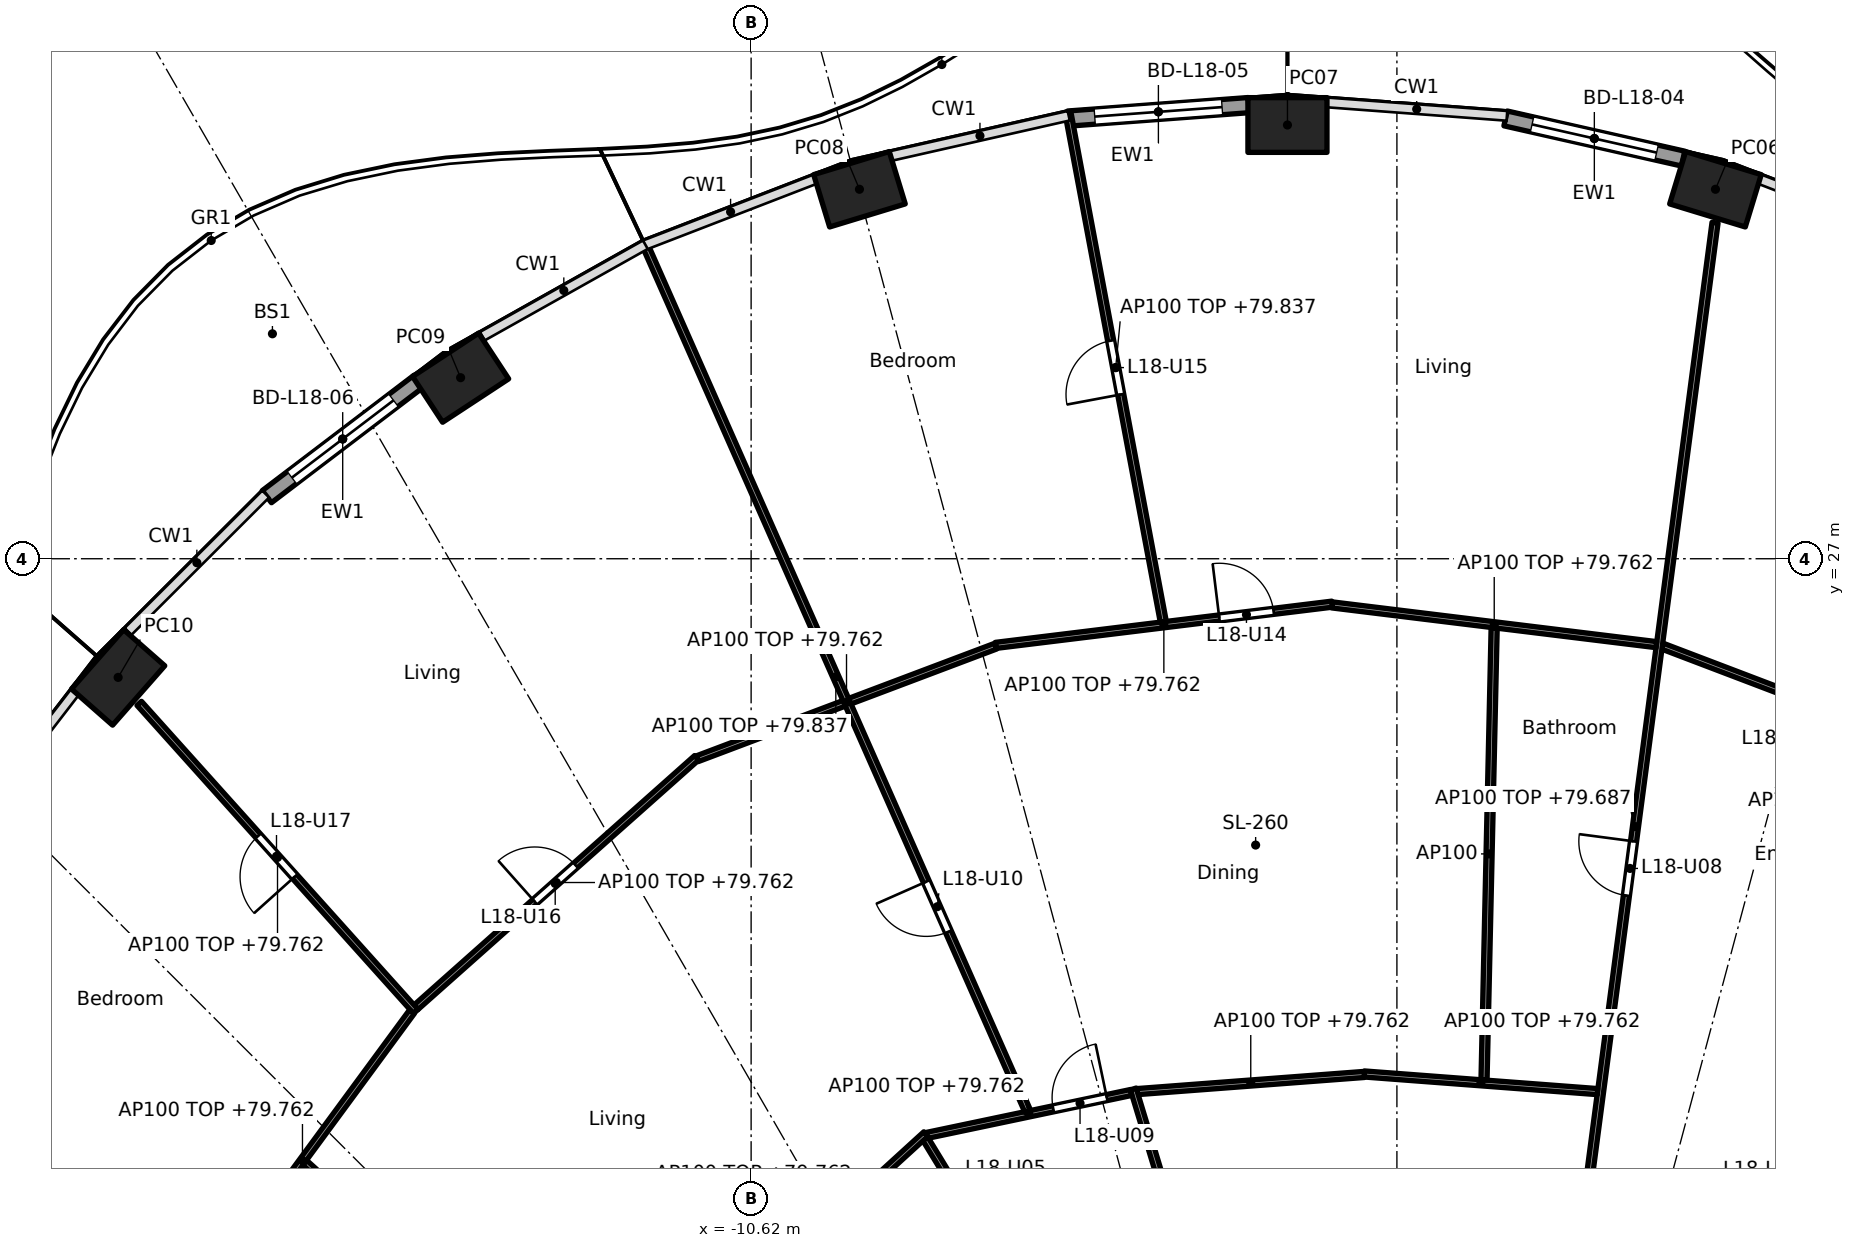
"""IFC4 building model, lengths in metres.
Left out: names, types, materials, properties, quantities, classifications, styles, units other than length and angle.
Written with IfcOpenShell. Run it as: python <this file> out.ifc"""

import sys

from ifc_helpers import new_model, si_unit, direction, frame, frame_2d, origin, origin_2d, place, context, subcontext, project, spatial, rectangle, hollow_rectangle, extrude, element, fill, save


model = new_model("IFC4")
c1 = context("Model", 3, precision=1e-05, world=origin(), true_north=direction((0.0, 1.0)))
c2 = subcontext(c1, "Body", "Model", "MODEL_VIEW")
j1 = project(units=[si_unit("LENGTHUNIT", "METRE"), si_unit("PLANEANGLEUNIT", "RADIAN")], contexts=[c1])
p1 = place(None, origin())
s1 = spatial("IfcSite", under=j1, at=p1, CompositionType="ELEMENT")
p2 = place(p1, origin())
s2 = spatial("IfcBuilding", under=s1, at=p2, CompositionType="ELEMENT")
p3 = place(p2, frame((0.0, 0.0, 77.0)))
s3 = spatial("IfcBuildingStorey", under=s2, at=p3, CompositionType="ELEMENT", Elevation=77.0)
for number, where, z_axis, x_axis in (
    (1, (5.239, 33.076, 0.0), (0.0, 0.0, 1.0), (-0.957, 0.292, 0.0)),
    (2, (-1.8, 34.133, 0.0), (0.0, 0.0, 1.0), (-1.0, 0.0, 0.0)),
    (3, (-8.839, 33.076, 0.0), (0.0, 0.0, 1.0), (-0.957, -0.292, 0.0)),
    (4, (-15.397, 29.978, 0.0), (0.0, 0.0, 1.0), (-0.836, -0.549, 0.0)),
    (5, (-21.03, 25.049, 0.0), (0.0, 0.0, 1.0), (-0.66, -0.751, 0.0)),
):
    element("IfcColumn", number, at=place(p3, frame(where, z_axis=z_axis, x_axis=x_axis)), inside=s3, PredefinedType="COLUMN", context=c2, shape_type="SweptSolid", body=[
        extrude(hollow_rectangle(XDim=1.3, YDim=0.9, WallThickness=0.045, at=origin_2d()), origin(), (0.0, 0.0, 1.0), 3.7),
    ])
p4 = place(p3, frame((1.787, 34.241, 0.0), z_axis=(0.0, 0.0, 1.0), x_axis=(0.975317607872, -0.220806620767, 0.0)))
e6 = element("IfcWall", 6, at=p4, inside=s3, PredefinedType="SOLIDWALL", context=c2, shape_type="SweptSolid", body=[
    extrude(rectangle(XDim=2.993, YDim=0.25, at=frame_2d((1.497, 0.0))), origin(), (0.0, 0.0, 1.0), 3.44),
])
p5 = place(p4, frame((0.447, 0.0, 0.0)))
e7 = element("IfcOpeningElement", 7, at=p5, cuts=e6, PredefinedType="OPENING", context=c2, shape_type="SweptSolid", body=[
    extrude(rectangle(XDim=2.1, YDim=2.4, at=frame_2d((1.05, 1.2))), frame((0.0, 0.135, 0.0), z_axis=(0.0, -1.0, 0.0), x_axis=(1.0, 0.0, 0.0)), (0.0, 0.0, 1.0), 0.27),
])
p6 = place(p3, frame((-5.406, 34.239, 0.0), z_axis=(0.0, 0.0, 1.0), x_axis=(0.997231808538, 0.074355363224, 0.0)))
e8 = element("IfcWall", 8, at=p6, inside=s3, PredefinedType="SOLIDWALL", context=c2, shape_type="SweptSolid", body=[
    extrude(rectangle(XDim=2.975, YDim=0.25, at=frame_2d((1.487, 0.0))), origin(), (0.0, 0.0, 1.0), 3.44),
])
p7 = place(p6, frame((0.438, 0.0, 0.0)))
e9 = element("IfcOpeningElement", 9, at=p7, cuts=e8, PredefinedType="OPENING", context=c2, shape_type="SweptSolid", body=[
    extrude(rectangle(XDim=2.1, YDim=2.4, at=frame_2d((1.05, 1.2))), frame((0.0, 0.135, 0.0), z_axis=(0.0, -1.0, 0.0), x_axis=(1.0, 0.0, 0.0)), (0.0, 0.0, 1.0), 0.27),
])
p8 = place(p3, frame((-18.584, 28.021, 0.0), z_axis=(0.0, 0.0, 1.0), x_axis=(0.796037575978, 0.605247203736, 0.0)))
e10 = element("IfcWall", 10, at=p8, inside=s3, PredefinedType="SOLIDWALL", context=c2, shape_type="SweptSolid", body=[
    extrude(rectangle(XDim=3.134, YDim=0.25, at=frame_2d((1.567, 0.0))), origin(), (0.0, 0.0, 1.0), 3.44),
])
p9 = place(p8, frame((0.517, 0.0, 0.0)))
e11 = element("IfcOpeningElement", 11, at=p9, cuts=e10, PredefinedType="OPENING", context=c2, shape_type="SweptSolid", body=[
    extrude(rectangle(XDim=2.1, YDim=2.4, at=frame_2d((1.05, 1.2))), frame((0.0, 0.135, 0.0), z_axis=(0.0, -1.0, 0.0), x_axis=(1.0, 0.0, 0.0)), (0.0, 0.0, 1.0), 0.27),
])
p10 = place(p3, frame((6.141, 14.829, 0.0), z_axis=(0.0, 0.0, 1.0), x_axis=(0.354477134193, 0.935064682968, 0.0)))
e12 = element("IfcWall", 12, at=p10, inside=s3, PredefinedType="PARTITIONING", context=c2, shape_type="SweptSolid", body=[
    extrude(rectangle(XDim=15.626, YDim=0.1, at=frame_2d((7.813, 0.0))), origin(), (0.0, 0.0, 1.0), 2.762),
])
p11 = place(p10, frame((1.35, 0.0, 0.0)))
e13 = element("IfcOpeningElement", 13, at=p11, cuts=e12, PredefinedType="OPENING", context=c2, shape_type="SweptSolid", body=[
    extrude(rectangle(XDim=0.9, YDim=2.1, at=frame_2d((0.45, 1.05))), frame((0.0, 0.06, 0.0), z_axis=(0.0, -1.0, 0.0), x_axis=(1.0, 0.0, 0.0)), (0.0, 0.0, 1.0), 0.12),
])
p12 = place(p10, frame((5.606, 0.0, 0.0)))
e14 = element("IfcOpeningElement", 14, at=p12, cuts=e12, PredefinedType="OPENING", context=c2, shape_type="SweptSolid", body=[
    extrude(rectangle(XDim=0.9, YDim=2.1, at=frame_2d((0.45, 1.05))), frame((0.0, 0.06, 0.0), z_axis=(0.0, -1.0, 0.0), x_axis=(1.0, 0.0, 0.0)), (0.0, 0.0, 1.0), 0.12),
])
p13 = place(p3, frame((9.426, 23.637, 0.0), z_axis=(0.0, 0.0, 1.0), x_axis=(-0.93461405629, 0.355663557011, 0.0)))
e15 = element("IfcWall", 15, at=p13, inside=s3, PredefinedType="PARTITIONING", context=c2, shape_type="SweptSolid", body=[
    extrude(rectangle(XDim=5.417, YDim=0.1, at=frame_2d((2.708, 0.0))), origin(), (0.0, 0.0, 1.0), 2.762),
])
p14 = place(p13, frame((2.258, 0.0, 0.0)))
e16 = element("IfcOpeningElement", 16, at=p14, cuts=e15, PredefinedType="OPENING", context=c2, shape_type="SweptSolid", body=[
    extrude(rectangle(XDim=0.9, YDim=2.1, at=frame_2d((0.45, 1.05))), frame((0.0, 0.06, 0.0), z_axis=(0.0, -1.0, 0.0), x_axis=(1.0, 0.0, 0.0)), (0.0, 0.0, 1.0), 0.12),
])
p15 = place(p3, frame((2.615, 12.664, 0.0), z_axis=(0.0, 0.0, 1.0), x_axis=(0.130614967904, 0.99143316979, 0.0)))
e17 = element("IfcWall", 17, at=p15, inside=s3, PredefinedType="PARTITIONING", context=c2, shape_type="SweptSolid", body=[
    extrude(rectangle(XDim=20.034, YDim=0.1, at=frame_2d((10.017, 0.0))), origin(), (0.0, 0.0, 1.0), 2.687),
])
p16 = place(p15, frame((2.359, 0.0, 0.0)))
e18 = element("IfcOpeningElement", 18, at=p16, cuts=e17, PredefinedType="OPENING", context=c2, shape_type="SweptSolid", body=[
    extrude(rectangle(XDim=0.9, YDim=2.1, at=frame_2d((0.45, 1.05))), frame((0.0, 0.06, 0.0), z_axis=(0.0, -1.0, 0.0), x_axis=(1.0, 0.0, 0.0)), (0.0, 0.0, 1.0), 0.12),
])
p17 = place(p15, frame((8.873, 0.0, 0.0)))
e19 = element("IfcOpeningElement", 19, at=p17, cuts=e17, PredefinedType="OPENING", context=c2, shape_type="SweptSolid", body=[
    extrude(rectangle(XDim=0.9, YDim=2.1, at=frame_2d((0.45, 1.05))), frame((0.0, 0.06, 0.0), z_axis=(0.0, -1.0, 0.0), x_axis=(1.0, 0.0, 0.0)), (0.0, 0.0, 1.0), 0.12),
])
p18 = place(p3, frame((3.299, 18.237, 0.0), z_axis=(0.0, 0.0, 1.0), x_axis=(-0.997152243414, 0.075414875552, 0.0)))
e20 = element("IfcWall", 20, at=p18, inside=s3, PredefinedType="PARTITIONING", context=c2, shape_type="SweptSolid", body=[
    extrude(rectangle(XDim=3.846, YDim=0.1, at=frame_2d((1.923, 0.0))), origin(), (0.0, 0.0, 1.0), 2.762),
])
p19 = place(p3, frame((4.267, 25.587, 0.0), z_axis=(0.0, 0.0, 1.0), x_axis=(-0.992576206119, 0.121624319302, 0.0)))
e21 = element("IfcWall", 21, at=p19, inside=s3, PredefinedType="PARTITIONING", context=c2, shape_type="SweptSolid", body=[
    extrude(rectangle(XDim=5.374, YDim=0.1, at=frame_2d((2.687, 0.0))), origin(), (0.0, 0.0, 1.0), 2.762),
])
p20 = place(p3, frame((1.433, 18.428, 0.0), z_axis=(0.0, 0.0, 1.0), x_axis=(0.022419421812, 0.999748653175, 0.0)))
e22 = element("IfcWall", 22, at=p20, inside=s3, PredefinedType="PARTITIONING", context=c2, shape_type="SweptSolid", body=[
    extrude(rectangle(XDim=7.438, YDim=0.1, at=frame_2d((3.719, 0.0))), origin(), (0.0, 0.0, 1.0), 3.44),
])
p21 = place(p3, frame((-0.536, 18.519, 0.0), z_axis=(0.0, 0.0, 1.0), x_axis=(-0.99715294352, -0.075405618017, 0.0)))
e23 = element("IfcWall", 23, at=p21, inside=s3, PredefinedType="PARTITIONING", context=c2, shape_type="SweptSolid", body=[
    extrude(rectangle(XDim=3.746, YDim=0.1, at=frame_2d((1.873, 0.0))), origin(), (0.0, 0.0, 1.0), 2.762),
])
p22 = place(p3, frame((-1.066, 26.253, 0.0), z_axis=(0.0, 0.0, 1.0), x_axis=(-0.992574197255, -0.121640712523, 0.0)))
e24 = element("IfcWall", 24, at=p22, inside=s3, PredefinedType="PARTITIONING", context=c2, shape_type="SweptSolid", body=[
    extrude(rectangle(XDim=5.574, YDim=0.1, at=frame_2d((2.787, 0.0))), origin(), (0.0, 0.0, 1.0), 2.762),
])
p23 = place(p22, frame((0.969, 0.0, 0.0)))
e25 = element("IfcOpeningElement", 25, at=p23, cuts=e24, PredefinedType="OPENING", context=c2, shape_type="SweptSolid", body=[
    extrude(rectangle(XDim=0.9, YDim=2.1, at=frame_2d((0.45, 1.05))), frame((0.0, 0.06, 0.0), z_axis=(0.0, -1.0, 0.0), x_axis=(1.0, 0.0, 0.0)), (0.0, 0.0, 1.0), 0.12),
])
p24 = place(p3, frame((-3.842, 25.963, 0.0), z_axis=(0.0, 0.0, 1.0), x_axis=(-0.184068442651, 0.982913428752, 0.0)))
e26 = element("IfcWall", 26, at=p24, inside=s3, PredefinedType="PARTITIONING", context=c2, shape_type="SweptSolid", body=[
    extrude(rectangle(XDim=8.506, YDim=0.1, at=frame_2d((4.253, 0.0))), origin(), (0.0, 0.0, 1.0), 2.837),
])
p25 = place(p24, frame((3.803, 0.0, 0.0)))
e27 = element("IfcOpeningElement", 27, at=p25, cuts=e26, PredefinedType="OPENING", context=c2, shape_type="SweptSolid", body=[
    extrude(rectangle(XDim=0.9, YDim=2.1, at=frame_2d((0.45, 1.05))), frame((0.0, 0.06, 0.0), z_axis=(0.0, -1.0, 0.0), x_axis=(1.0, 0.0, 0.0)), (0.0, 0.0, 1.0), 0.12),
])
p26 = place(p3, frame((-2.631, 12.66, 0.0), z_axis=(0.0, 0.0, 1.0), x_axis=(-0.290145836284, 0.956982441682, 0.0)))
e28 = element("IfcWall", 28, at=p26, inside=s3, PredefinedType="PARTITIONING", context=c2, shape_type="SweptSolid", body=[
    extrude(rectangle(XDim=5.873, YDim=0.1, at=frame_2d((2.937, 0.0))), origin(), (0.0, 0.0, 1.0), 2.687),
])
p27 = place(p26, frame((0.772, 0.0, 0.0)))
e29 = element("IfcOpeningElement", 29, at=p27, cuts=e28, PredefinedType="OPENING", context=c2, shape_type="SweptSolid", body=[
    extrude(rectangle(XDim=0.9, YDim=2.1, at=frame_2d((0.45, 1.05))), frame((0.0, 0.06, 0.0), z_axis=(0.0, -1.0, 0.0), x_axis=(1.0, 0.0, 0.0)), (0.0, 0.0, 1.0), 0.12),
])
p28 = place(p3, frame((-4.37, 18.223, 0.0), z_axis=(0.0, 0.0, 1.0), x_axis=(-0.978619056583, -0.205681166112, 0.0)))
e30 = element("IfcWall", 30, at=p28, inside=s3, PredefinedType="PARTITIONING", context=c2, shape_type="SweptSolid", body=[
    extrude(rectangle(XDim=3.438, YDim=0.1, at=frame_2d((1.719, 0.0))), origin(), (0.0, 0.0, 1.0), 2.762),
])
p29 = place(p28, frame((0.409, 0.0, 0.0)))
e31 = element("IfcOpeningElement", 31, at=p29, cuts=e30, PredefinedType="OPENING", context=c2, shape_type="SweptSolid", body=[
    extrude(rectangle(XDim=0.9, YDim=2.1, at=frame_2d((0.45, 1.05))), frame((0.0, 0.06, 0.0), z_axis=(0.0, -1.0, 0.0), x_axis=(1.0, 0.0, 0.0)), (0.0, 0.0, 1.0), 0.12),
])
p30 = place(p3, frame((-6.596, 25.563, 0.0), z_axis=(0.0, 0.0, 1.0), x_axis=(-0.9356162121, -0.353018843201, 0.0)))
e32 = element("IfcWall", 32, at=p30, inside=s3, PredefinedType="PARTITIONING", context=c2, shape_type="SweptSolid", body=[
    extrude(rectangle(XDim=5.249, YDim=0.1, at=frame_2d((2.625, 0.0))), origin(), (0.0, 0.0, 1.0), 2.762),
])
p31 = place(p3, frame((-6.072, 17.915, 0.0), z_axis=(0.0, 0.0, 1.0), x_axis=(-0.404139814253, 0.914697223422, 0.0)))
e33 = element("IfcWall", 33, at=p31, inside=s3, PredefinedType="PARTITIONING", context=c2, shape_type="SweptSolid", body=[
    extrude(rectangle(XDim=15.614, YDim=0.1, at=frame_2d((7.807, 0.0))), origin(), (0.0, 0.0, 1.0), 2.837),
])
p32 = place(p31, frame((3.226, 0.0, 0.0)))
e34 = element("IfcOpeningElement", 34, at=p32, cuts=e33, PredefinedType="OPENING", context=c2, shape_type="SweptSolid", body=[
    extrude(rectangle(XDim=0.9, YDim=2.1, at=frame_2d((0.45, 1.05))), frame((0.0, 0.06, 0.0), z_axis=(0.0, -1.0, 0.0), x_axis=(1.0, 0.0, 0.0)), (0.0, 0.0, 1.0), 0.12),
])
p33 = place(p3, frame((-6.149, 14.825, 0.0), z_axis=(0.0, 0.0, 1.0), x_axis=(-0.520433196839, 0.853902387646, 0.0)))
e35 = element("IfcWall", 35, at=p33, inside=s3, PredefinedType="PARTITIONING", context=c2, shape_type="SweptSolid", body=[
    extrude(rectangle(XDim=3.09, YDim=0.1, at=frame_2d((1.545, 0.0))), origin(), (0.0, 0.0, 1.0), 3.44),
])
p34 = place(p33, frame((1.542, 0.0, 0.0)))
e36 = element("IfcOpeningElement", 36, at=p34, cuts=e35, PredefinedType="OPENING", context=c2, shape_type="SweptSolid", body=[
    extrude(rectangle(XDim=0.9, YDim=2.1, at=frame_2d((0.45, 1.05))), frame((0.0, 0.06, 0.0), z_axis=(0.0, -1.0, 0.0), x_axis=(1.0, 0.0, 0.0)), (0.0, 0.0, 1.0), 0.12),
])
p35 = place(p3, frame((-7.746, 17.539, 0.0), z_axis=(0.0, 0.0, 1.0), x_axis=(-0.738860434967, -0.673858484877, 0.0)))
e37 = element("IfcWall", 37, at=p35, inside=s3, PredefinedType="PARTITIONING", context=c2, shape_type="SweptSolid", body=[
    extrude(rectangle(XDim=4.947, YDim=0.1, at=frame_2d((2.473, 0.0))), origin(), (0.0, 0.0, 1.0), 2.762),
])
p36 = place(p3, frame((-11.516, 23.726, 0.0), z_axis=(0.0, 0.0, 1.0), x_axis=(-0.747428955243, -0.664341747043, 0.0)))
e38 = element("IfcWall", 38, at=p36, inside=s3, PredefinedType="PARTITIONING", context=c2, shape_type="SweptSolid", body=[
    extrude(rectangle(XDim=6.174, YDim=0.1, at=frame_2d((3.087, 0.0))), origin(), (0.0, 0.0, 1.0), 2.762),
])
p37 = place(p36, frame((2.662, 0.0, 0.0)))
e39 = element("IfcOpeningElement", 39, at=p37, cuts=e38, PredefinedType="OPENING", context=c2, shape_type="SweptSolid", body=[
    extrude(rectangle(XDim=0.9, YDim=2.1, at=frame_2d((0.45, 1.05))), frame((0.0, 0.06, 0.0), z_axis=(0.0, -1.0, 0.0), x_axis=(1.0, 0.0, 0.0)), (0.0, 0.0, 1.0), 0.12),
])
p38 = place(p3, frame((-16.134, 19.554, 0.0), z_axis=(0.0, 0.0, 1.0), x_axis=(-0.667985610263, 0.74417418961, 0.0)))
e40 = element("IfcWall", 40, at=p38, inside=s3, PredefinedType="PARTITIONING", context=c2, shape_type="SweptSolid", body=[
    extrude(rectangle(XDim=6.809, YDim=0.1, at=frame_2d((3.405, 0.0))), origin(), (0.0, 0.0, 1.0), 2.762),
])
p39 = place(p38, frame((2.98, 0.0, 0.0)))
e41 = element("IfcOpeningElement", 41, at=p39, cuts=e40, PredefinedType="OPENING", context=c2, shape_type="SweptSolid", body=[
    extrude(rectangle(XDim=0.9, YDim=2.1, at=frame_2d((0.45, 1.05))), frame((0.0, 0.06, 0.0), z_axis=(0.0, -1.0, 0.0), x_axis=(1.0, 0.0, 0.0)), (0.0, 0.0, 1.0), 0.12),
])
p40 = place(p3, frame((-16.197, 19.551, 0.0), z_axis=(0.0, 0.0, 1.0), x_axis=(-0.592391983588, -0.80564988536, 0.0)))
e42 = element("IfcWall", 42, at=p40, inside=s3, PredefinedType="PARTITIONING", context=c2, shape_type="SweptSolid", body=[
    extrude(rectangle(XDim=6.08, YDim=0.1, at=frame_2d((3.04, 0.0))), origin(), (0.0, 0.0, 1.0), 2.762),
])
p41 = place(p3, frame((-8.959, 8.952, 0.0), z_axis=(0.0, 0.0, 1.0), x_axis=(-0.742679904999, 0.669646592398, 0.0)))
e43 = element("IfcWall", 43, at=p41, inside=s3, PredefinedType="PARTITIONING", context=c2, shape_type="SweptSolid", body=[
    extrude(rectangle(XDim=12.121, YDim=0.1, at=frame_2d((6.061, 0.0))), origin(), (0.0, 0.0, 1.0), 2.687),
])
p42 = place(p41, frame((2.172, 0.0, 0.0)))
e44 = element("IfcOpeningElement", 44, at=p42, cuts=e43, PredefinedType="OPENING", context=c2, shape_type="SweptSolid", body=[
    extrude(rectangle(XDim=0.9, YDim=2.1, at=frame_2d((0.45, 1.05))), frame((0.0, 0.06, 0.0), z_axis=(0.0, -1.0, 0.0), x_axis=(1.0, 0.0, 0.0)), (0.0, 0.0, 1.0), 0.12),
])
p43 = place(p41, frame((8.233, 0.0, 0.0)))
e45 = element("IfcOpeningElement", 45, at=p43, cuts=e43, PredefinedType="OPENING", context=c2, shape_type="SweptSolid", body=[
    extrude(rectangle(XDim=0.9, YDim=2.1, at=frame_2d((0.45, 1.05))), frame((0.0, 0.06, 0.0), z_axis=(0.0, -1.0, 0.0), x_axis=(1.0, 0.0, 0.0)), (0.0, 0.0, 1.0), 0.12),
])
p44 = place(p3, frame((-19.788, 14.583, 0.0), z_axis=(0.0, 0.0, 1.0), x_axis=(-0.813175286569, 0.58201885993, 0.0)))
e46 = element("IfcWall", 46, at=p44, inside=s3, PredefinedType="PARTITIONING", context=c2, shape_type="SweptSolid", body=[
    extrude(rectangle(XDim=6.329, YDim=0.1, at=frame_2d((3.164, 0.0))), origin(), (0.0, 0.0, 1.0), 2.762),
])
p45 = place(p5, origin())
e47 = element("IfcDoor", 47, at=p45, inside=s3, OperationType="SLIDING_TO_LEFT", PredefinedType="DOOR", context=c2, shape_type="SweptSolid", body=[
    extrude(rectangle(XDim=2.1, YDim=2.4, at=frame_2d((1.05, 1.2))), frame((0.0, 0.025, 0.0), z_axis=(0.0, -1.0, 0.0), x_axis=(1.0, 0.0, 0.0)), (0.0, 0.0, 1.0), 0.05),
])
fill(e7, e47)
p46 = place(p7, origin())
e48 = element("IfcDoor", 48, at=p46, inside=s3, OperationType="SLIDING_TO_LEFT", PredefinedType="DOOR", context=c2, shape_type="SweptSolid", body=[
    extrude(rectangle(XDim=2.1, YDim=2.4, at=frame_2d((1.05, 1.2))), frame((0.0, 0.025, 0.0), z_axis=(0.0, -1.0, 0.0), x_axis=(1.0, 0.0, 0.0)), (0.0, 0.0, 1.0), 0.05),
])
fill(e9, e48)
p47 = place(p9, origin())
e49 = element("IfcDoor", 49, at=p47, inside=s3, OperationType="SLIDING_TO_LEFT", PredefinedType="DOOR", context=c2, shape_type="SweptSolid", body=[
    extrude(rectangle(XDim=2.1, YDim=2.4, at=frame_2d((1.05, 1.2))), frame((0.0, 0.025, 0.0), z_axis=(0.0, -1.0, 0.0), x_axis=(1.0, 0.0, 0.0)), (0.0, 0.0, 1.0), 0.05),
])
fill(e11, e49)
p48 = place(p17, origin())
e50 = element("IfcDoor", 50, at=p48, inside=s3, OperationType="SINGLE_SWING_RIGHT", PredefinedType="DOOR", context=c2, shape_type="SweptSolid", body=[
    extrude(rectangle(XDim=0.9, YDim=2.1, at=frame_2d((0.45, 1.05))), frame((0.0, 0.025, 0.0), z_axis=(0.0, -1.0, 0.0), x_axis=(1.0, 0.0, 0.0)), (0.0, 0.0, 1.0), 0.05),
])
fill(e19, e50)
p49 = place(p29, frame((0.9, 0.0, 0.0), x_axis=(-1.0, 0.0, 0.0)))
e51 = element("IfcDoor", 51, at=p49, inside=s3, OperationType="SINGLE_SWING_RIGHT", PredefinedType="DOOR", context=c2, shape_type="SweptSolid", body=[
    extrude(rectangle(XDim=0.9, YDim=2.1, at=frame_2d((0.45, 1.05))), frame((0.0, 0.025, 0.0), z_axis=(0.0, -1.0, 0.0), x_axis=(1.0, 0.0, 0.0)), (0.0, 0.0, 1.0), 0.05),
])
fill(e31, e51)
p50 = place(p32, origin())
e52 = element("IfcDoor", 52, at=p50, inside=s3, OperationType="SINGLE_SWING_RIGHT", PredefinedType="DOOR", context=c2, shape_type="SweptSolid", body=[
    extrude(rectangle(XDim=0.9, YDim=2.1, at=frame_2d((0.45, 1.05))), frame((0.0, 0.025, 0.0), z_axis=(0.0, -1.0, 0.0), x_axis=(1.0, 0.0, 0.0)), (0.0, 0.0, 1.0), 0.05),
])
fill(e34, e52)
p51 = place(p23, frame((0.9, 0.0, 0.0), x_axis=(-1.0, 0.0, 0.0)))
e53 = element("IfcDoor", 53, at=p51, inside=s3, OperationType="SINGLE_SWING_LEFT", PredefinedType="DOOR", context=c2, shape_type="SweptSolid", body=[
    extrude(rectangle(XDim=0.9, YDim=2.1, at=frame_2d((0.45, 1.05))), frame((0.0, 0.025, 0.0), z_axis=(0.0, -1.0, 0.0), x_axis=(1.0, 0.0, 0.0)), (0.0, 0.0, 1.0), 0.05),
])
fill(e25, e53)
p52 = place(p25, origin())
e54 = element("IfcDoor", 54, at=p52, inside=s3, OperationType="SINGLE_SWING_LEFT", PredefinedType="DOOR", context=c2, shape_type="SweptSolid", body=[
    extrude(rectangle(XDim=0.9, YDim=2.1, at=frame_2d((0.45, 1.05))), frame((0.0, 0.025, 0.0), z_axis=(0.0, -1.0, 0.0), x_axis=(1.0, 0.0, 0.0)), (0.0, 0.0, 1.0), 0.05),
])
fill(e27, e54)
p53 = place(p37, frame((0.9, 0.0, 0.0), x_axis=(-1.0, 0.0, 0.0)))
e55 = element("IfcDoor", 55, at=p53, inside=s3, OperationType="SINGLE_SWING_LEFT", PredefinedType="DOOR", context=c2, shape_type="SweptSolid", body=[
    extrude(rectangle(XDim=0.9, YDim=2.1, at=frame_2d((0.45, 1.05))), frame((0.0, 0.025, 0.0), z_axis=(0.0, -1.0, 0.0), x_axis=(1.0, 0.0, 0.0)), (0.0, 0.0, 1.0), 0.05),
])
fill(e39, e55)
p54 = place(p39, origin())
e56 = element("IfcDoor", 56, at=p54, inside=s3, OperationType="SINGLE_SWING_LEFT", PredefinedType="DOOR", context=c2, shape_type="SweptSolid", body=[
    extrude(rectangle(XDim=0.9, YDim=2.1, at=frame_2d((0.45, 1.05))), frame((0.0, 0.025, 0.0), z_axis=(0.0, -1.0, 0.0), x_axis=(1.0, 0.0, 0.0)), (0.0, 0.0, 1.0), 0.05),
])
fill(e41, e56)
save(model, sys.argv[1])
